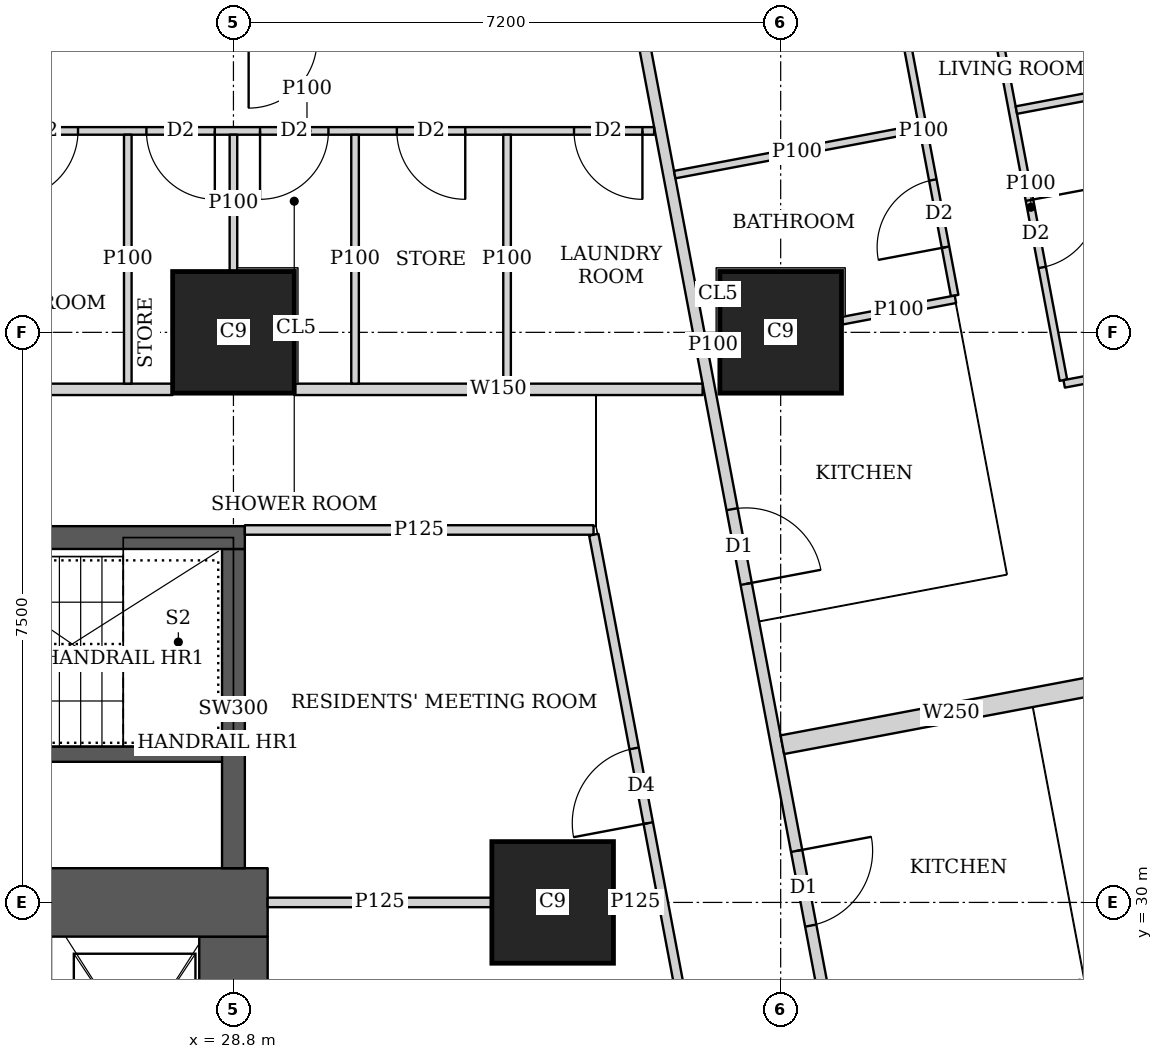
"""IFC4 building model, lengths in metres.
Left out: names, types, materials, properties, quantities, classifications, styles, units other than length and angle.
Written with IfcOpenShell. Run it as: python <this file> out.ifc"""

import sys

from ifc_helpers import new_model, si_unit, direction, frame, frame_2d, origin, origin_2d, place, context, subcontext, project, spatial, rectangle, extrude, element, fill, save


model = new_model("IFC4")
c1 = context("Model", 3, precision=1e-05, world=origin(), true_north=direction((0.0, 1.0)))
c2 = subcontext(c1, "Body", "Model", "MODEL_VIEW")
j1 = project(units=[si_unit("LENGTHUNIT", "METRE"), si_unit("PLANEANGLEUNIT", "RADIAN")], contexts=[c1])
p1 = place(None, origin())
s1 = spatial("IfcSite", under=j1, at=p1, CompositionType="ELEMENT")
p2 = place(p1, origin())
s2 = spatial("IfcBuilding", under=s1, at=p2, CompositionType="ELEMENT")
p3 = place(p2, frame((0.0, 0.0, 100.4)))
s3 = spatial("IfcBuildingStorey", under=s2, at=p3, CompositionType="ELEMENT", Elevation=100.4)
for number, where, z_axis, x_axis in (
    (1, (33.0, 30.0, 0.0), (0.0, 0.0, 1.0), (1.0, 0.0, 0.0)),
    (2, (28.8, 37.5, 0.0), (0.0, 0.0, 1.0), (1.0, 0.0, 0.0)),
    (3, (36.0, 37.5, 0.0), (0.0, 0.0, 1.0), (1.0, 0.0, 0.0)),
):
    element("IfcColumn", number, at=place(p3, frame(where, z_axis=z_axis, x_axis=x_axis)), inside=s3, PredefinedType="COLUMN", context=c2, shape_type="SweptSolid", body=[
        extrude(rectangle(XDim=1.6, YDim=1.6, at=origin_2d()), origin(), (0.0, 0.0, 1.0), 3.75),
    ])
p4 = place(p3, frame((13.95, 30.0, 0.0), z_axis=(0.0, 0.0, 1.0), x_axis=(1.0, 0.0, 0.0)))
e4 = element("IfcWall", 4, at=p4, inside=s3, PredefinedType="SHEAR", context=c2, shape_type="SweptSolid", body=[
    extrude(rectangle(XDim=15.3, YDim=0.9, at=frame_2d((7.65, 0.0))), origin(), (0.0, 0.0, 1.0), 3.75),
])
p5 = place(p4, frame((4.45, 0.0, 0.0)))
e5 = element("IfcOpeningElement", 5, at=p5, cuts=e4, PredefinedType="OPENING", context=c2, shape_type="SweptSolid", body=[
    extrude(rectangle(XDim=1.8, YDim=2.1, at=frame_2d((0.9, 1.05))), frame((0.0, 0.46, 0.0), z_axis=(0.0, -1.0, 0.0), x_axis=(1.0, 0.0, 0.0)), (0.0, 0.0, 1.0), 0.92),
])
p6 = place(p4, frame((10.7, 0.0, 0.0)))
e6 = element("IfcOpeningElement", 6, at=p6, cuts=e4, PredefinedType="OPENING", context=c2, shape_type="SweptSolid", body=[
    extrude(rectangle(XDim=1.1, YDim=2.1, at=frame_2d((0.55, 1.05))), frame((0.0, 0.46, 0.0), z_axis=(0.0, -1.0, 0.0), x_axis=(1.0, 0.0, 0.0)), (0.0, 0.0, 1.0), 0.92),
])
p7 = place(p3, frame((28.8, 15.45, 0.0), z_axis=(0.0, 0.0, 1.0), x_axis=(0.0, 1.0, 0.0)))
e7 = element("IfcWall", 7, at=p7, inside=s3, PredefinedType="SHEAR", context=c2, shape_type="SweptSolid", body=[
    extrude(rectangle(XDim=14.1, YDim=0.9, at=frame_2d((7.05, 0.0))), origin(), (0.0, 0.0, 1.0), 3.75),
])
p8 = place(p3, frame((21.45, 34.8, 0.0), z_axis=(0.0, 0.0, 1.0), x_axis=(1.0, 0.0, 0.0)))
e8 = element("IfcWall", 8, at=p8, inside=s3, PredefinedType="SHEAR", context=c2, shape_type="SweptSolid", body=[
    extrude(rectangle(XDim=7.5, YDim=0.3, at=frame_2d((3.75, 0.0))), origin(), (0.0, 0.0, 1.0), 3.75),
])
p9 = place(p8, frame((0.5, 0.0, 0.0)))
e9 = element("IfcOpeningElement", 9, at=p9, cuts=e8, PredefinedType="OPENING", context=c2, shape_type="SweptSolid", body=[
    extrude(rectangle(XDim=1.1, YDim=2.1, at=frame_2d((0.55, 1.05))), frame((0.0, 0.16, 0.0), z_axis=(0.0, -1.0, 0.0), x_axis=(1.0, 0.0, 0.0)), (0.0, 0.0, 1.0), 0.32),
])
p10 = place(p3, frame((28.8, 30.45, 0.0), z_axis=(0.0, 0.0, 1.0), x_axis=(0.0, 1.0, 0.0)))
e10 = element("IfcWall", 10, at=p10, inside=s3, PredefinedType="SHEAR", context=c2, shape_type="SweptSolid", body=[
    extrude(rectangle(XDim=4.2, YDim=0.3, at=frame_2d((2.1, 0.0))), origin(), (0.0, 0.0, 1.0), 3.75),
])
p11 = place(p3, frame((22.401, 36.75, 0.0), z_axis=(0.0, 0.0, 1.0), x_axis=(1.0, 0.0, 0.0)))
e11 = element("IfcWall", 11, at=p11, inside=s3, PredefinedType="SOLIDWALL", context=c2, shape_type="SweptSolid", body=[
    extrude(rectangle(XDim=5.598, YDim=0.15, at=frame_2d((2.799, 0.0))), origin(), (0.0, 0.0, 1.0), 3.5),
])
p12 = place(p11, frame((0.699, 0.0, 0.0)))
e12 = element("IfcOpeningElement", 12, at=p12, cuts=e11, PredefinedType="OPENING", context=c2, shape_type="SweptSolid", body=[
    extrude(rectangle(XDim=1.0, YDim=2.1, at=frame_2d((0.5, 1.05))), frame((0.0, 0.085, 0.0), z_axis=(0.0, -1.0, 0.0), x_axis=(1.0, 0.0, 0.0)), (0.0, 0.0, 1.0), 0.17),
])
p13 = place(p3, frame((29.601, 36.75, 0.0), z_axis=(0.0, 0.0, 1.0), x_axis=(1.0, 0.0, 0.0)))
e13 = element("IfcWall", 13, at=p13, inside=s3, PredefinedType="SOLIDWALL", context=c2, shape_type="SweptSolid", body=[
    extrude(rectangle(XDim=5.372, YDim=0.15, at=frame_2d((2.686, 0.0))), origin(), (0.0, 0.0, 1.0), 3.5),
])
p14 = place(p3, frame((33.382, 45.65, 0.0), z_axis=(0.0, 0.0, 1.0), x_axis=(0.185593544777, -0.982626600565, 0.0)))
e14 = element("IfcWall", 14, at=p14, inside=s3, PredefinedType="SOLIDWALL", context=c2, shape_type="SweptSolid", body=[
    extrude(rectangle(XDim=47.118, YDim=0.15, at=frame_2d((23.559, 0.0))), origin(), (0.0, 0.0, 1.0), 2.2),
])
p15 = place(p14, frame((10.662, 0.0, 0.0)))
e15 = element("IfcOpeningElement", 15, at=p15, cuts=e14, PredefinedType="OPENING", context=c2, shape_type="SweptSolid", body=[
    extrude(rectangle(XDim=1.0, YDim=2.1, at=frame_2d((0.5, 1.05))), frame((0.0, 0.085, 0.0), z_axis=(0.0, -1.0, 0.0), x_axis=(1.0, 0.0, 0.0)), (0.0, 0.0, 1.0), 0.17),
])
p16 = place(p14, frame((15.237, 0.0, 0.0)))
e16 = element("IfcOpeningElement", 16, at=p16, cuts=e14, PredefinedType="OPENING", context=c2, shape_type="SweptSolid", body=[
    extrude(rectangle(XDim=1.0, YDim=2.1, at=frame_2d((0.5, 1.05))), frame((0.0, 0.085, 0.0), z_axis=(0.0, -1.0, 0.0), x_axis=(1.0, 0.0, 0.0)), (0.0, 0.0, 1.0), 0.17),
])
p17 = place(p14, frame((27.341, 0.0, 0.0)))
e17 = element("IfcOpeningElement", 17, at=p17, cuts=e14, PredefinedType="OPENING", context=c2, shape_type="SweptSolid", body=[
    extrude(rectangle(XDim=1.0, YDim=2.1, at=frame_2d((0.5, 1.05))), frame((0.0, 0.085, 0.0), z_axis=(0.0, -1.0, 0.0), x_axis=(1.0, 0.0, 0.0)), (0.0, 0.0, 1.0), 0.17),
])
p18 = place(p14, frame((33.833, 0.0, 0.0)))
e18 = element("IfcOpeningElement", 18, at=p18, cuts=e14, PredefinedType="OPENING", context=c2, shape_type="SweptSolid", body=[
    extrude(rectangle(XDim=1.0, YDim=2.1, at=frame_2d((0.5, 1.05))), frame((0.0, 0.085, 0.0), z_axis=(0.0, -1.0, 0.0), x_axis=(1.0, 0.0, 0.0)), (0.0, 0.0, 1.0), 0.17),
])
p19 = place(p3, frame((38.862, 41.42, 0.0), z_axis=(0.0, 0.0, 1.0), x_axis=(0.185332907641, -0.982675792592, 0.0)))
e19 = element("IfcWall", 19, at=p19, inside=s3, PredefinedType="PARTITIONING", context=c2, shape_type="SweptSolid", body=[
    extrude(rectangle(XDim=4.629, YDim=0.1, at=frame_2d((2.314, 0.0))), origin(), (0.0, 0.0, 1.0), 3.5),
])
p20 = place(p19, frame((2.22, 0.0, 0.0)))
e20 = element("IfcOpeningElement", 20, at=p20, cuts=e19, PredefinedType="OPENING", context=c2, shape_type="SweptSolid", body=[
    extrude(rectangle(XDim=0.9, YDim=2.1, at=frame_2d((0.45, 1.05))), frame((0.0, 0.06, 0.0), z_axis=(0.0, -1.0, 0.0), x_axis=(1.0, 0.0, 0.0)), (0.0, 0.0, 1.0), 0.12),
])
p21 = place(p3, frame((37.472, 42.309, 0.0), z_axis=(0.0, 0.0, 1.0), x_axis=(0.185641287362, -0.982617581985, 0.0)))
e21 = element("IfcWall", 21, at=p21, inside=s3, PredefinedType="PARTITIONING", context=c2, shape_type="SweptSolid", body=[
    extrude(rectangle(XDim=4.402, YDim=0.1, at=frame_2d((2.201, 0.0))), origin(), (0.0, 0.0, 1.0), 3.5),
])
p22 = place(p21, frame((2.854, 0.0, 0.0)))
e22 = element("IfcOpeningElement", 22, at=p22, cuts=e21, PredefinedType="OPENING", context=c2, shape_type="SweptSolid", body=[
    extrude(rectangle(XDim=0.9, YDim=2.1, at=frame_2d((0.45, 1.05))), frame((0.0, 0.06, 0.0), z_axis=(0.0, -1.0, 0.0), x_axis=(1.0, 0.0, 0.0)), (0.0, 0.0, 1.0), 0.12),
])
p23 = place(p3, frame((43.277, 41.212, 0.0), z_axis=(0.0, 0.0, 1.0), x_axis=(-0.982665405803, -0.185387972203, 0.0)))
e23 = element("IfcWall", 23, at=p23, inside=s3, PredefinedType="PARTITIONING", context=c2, shape_type="SweptSolid", body=[
    extrude(rectangle(XDim=4.25, YDim=0.1, at=frame_2d((2.125, 0.0))), origin(), (0.0, 0.0, 1.0), 2.05),
])
p24 = place(p3, frame((40.954, 37.053, 0.0), z_axis=(0.0, 0.0, 1.0), x_axis=(-0.982663001154, -0.185400717808, 0.0)))
e24 = element("IfcWall", 24, at=p24, inside=s3, PredefinedType="PARTITIONING", context=c2, shape_type="SweptSolid", body=[
    extrude(rectangle(XDim=1.246, YDim=0.1, at=frame_2d((0.623, 0.0))), origin(), (0.0, 0.0, 1.0), 2.05),
])
p25 = place(p3, frame((37.823, 40.182, 0.0), z_axis=(0.0, 0.0, 1.0), x_axis=(-0.982664729897, -0.18539155487, 0.0)))
e25 = element("IfcWall", 25, at=p25, inside=s3, PredefinedType="PARTITIONING", context=c2, shape_type="SweptSolid", body=[
    extrude(rectangle(XDim=3.274, YDim=0.1, at=frame_2d((1.637, 0.0))), origin(), (0.0, 0.0, 1.0), 3.5),
])
p26 = place(p3, frame((38.299, 37.935, 0.0), z_axis=(0.0, 0.0, 1.0), x_axis=(-0.982536828695, -0.186068213993, 0.0)))
e26 = element("IfcWall", 26, at=p26, inside=s3, PredefinedType="PARTITIONING", context=c2, shape_type="SweptSolid", body=[
    extrude(rectangle(XDim=1.515, YDim=0.1, at=frame_2d((0.758, 0.0))), origin(), (0.0, 0.0, 1.0), 3.5),
])
p27 = place(p3, frame((35.19, 37.347, 0.0), z_axis=(0.0, 0.0, 1.0), x_axis=(-0.982404955251, -0.186763229514, 0.0)))
e27 = element("IfcWall", 27, at=p27, inside=s3, PredefinedType="PARTITIONING", context=c2, shape_type="SweptSolid", body=[
    extrude(rectangle(XDim=0.161, YDim=0.1, at=frame_2d((0.081, 0.0))), origin(), (0.0, 0.0, 1.0), 3.5),
])
p28 = place(p3, frame((40.468, 32.915, 0.0), z_axis=(0.0, 0.0, 1.0), x_axis=(-0.982612837616, -0.185666398014, 0.0)))
e28 = element("IfcWall", 28, at=p28, inside=s3, PredefinedType="SOLIDWALL", context=c2, shape_type="SweptSolid", body=[
    extrude(rectangle(XDim=4.525, YDim=0.25, at=frame_2d((2.262, 0.0))), origin(), (0.0, 0.0, 1.0), 3.5),
])
p29 = place(p3, frame((25.2, 40.15, 0.0), z_axis=(0.0, 0.0, 1.0), x_axis=(1.0, 0.0, 0.0)))
e29 = element("IfcWall", 29, at=p29, inside=s3, PredefinedType="PARTITIONING", context=c2, shape_type="SweptSolid", body=[
    extrude(rectangle(XDim=9.135, YDim=0.1, at=frame_2d((4.567, 0.0))), origin(), (0.0, 0.0, 1.0), 3.5),
])
p30 = place(p29, frame((0.655, 0.0, 0.0)))
e30 = element("IfcOpeningElement", 30, at=p30, cuts=e29, PredefinedType="OPENING", context=c2, shape_type="SweptSolid", body=[
    extrude(rectangle(XDim=0.9, YDim=2.1, at=frame_2d((0.45, 1.05))), frame((0.0, 0.06, 0.0), z_axis=(0.0, -1.0, 0.0), x_axis=(1.0, 0.0, 0.0)), (0.0, 0.0, 1.0), 0.12),
])
p31 = place(p29, frame((3.95, 0.0, 0.0)))
e31 = element("IfcOpeningElement", 31, at=p31, cuts=e29, PredefinedType="OPENING", context=c2, shape_type="SweptSolid", body=[
    extrude(rectangle(XDim=0.9, YDim=2.1, at=frame_2d((0.45, 1.05))), frame((0.0, 0.06, 0.0), z_axis=(0.0, -1.0, 0.0), x_axis=(1.0, 0.0, 0.0)), (0.0, 0.0, 1.0), 0.12),
])
p32 = place(p29, frame((8.081, 0.0, 0.0)))
e32 = element("IfcOpeningElement", 32, at=p32, cuts=e29, PredefinedType="OPENING", context=c2, shape_type="SweptSolid", body=[
    extrude(rectangle(XDim=0.9, YDim=2.1, at=frame_2d((0.45, 1.05))), frame((0.0, 0.06, 0.0), z_axis=(0.0, -1.0, 0.0), x_axis=(1.0, 0.0, 0.0)), (0.0, 0.0, 1.0), 0.12),
])
p33 = place(p29, frame((2.455, 0.0, 0.0)))
e33 = element("IfcOpeningElement", 33, at=p33, cuts=e29, PredefinedType="OPENING", context=c2, shape_type="SweptSolid", body=[
    extrude(rectangle(XDim=0.9, YDim=2.1, at=frame_2d((0.45, 1.05))), frame((0.0, 0.06, 0.0), z_axis=(0.0, -1.0, 0.0), x_axis=(1.0, 0.0, 0.0)), (0.0, 0.0, 1.0), 0.12),
])
p34 = place(p29, frame((5.75, 0.0, 0.0)))
e34 = element("IfcOpeningElement", 34, at=p34, cuts=e29, PredefinedType="OPENING", context=c2, shape_type="SweptSolid", body=[
    extrude(rectangle(XDim=0.9, YDim=2.1, at=frame_2d((0.45, 1.05))), frame((0.0, 0.06, 0.0), z_axis=(0.0, -1.0, 0.0), x_axis=(1.0, 0.0, 0.0)), (0.0, 0.0, 1.0), 0.12),
])
p35 = place(p3, frame((28.8, 38.301, 0.0), z_axis=(0.0, 0.0, 1.0), x_axis=(0.0, 1.0, 0.0)))
e35 = element("IfcWall", 35, at=p35, inside=s3, PredefinedType="PARTITIONING", context=c2, shape_type="SweptSolid", body=[
    extrude(rectangle(XDim=1.799, YDim=0.1, at=frame_2d((0.899, 0.0))), origin(), (0.0, 0.0, 1.0), 3.5),
])
for number, where, z_axis, x_axis in (
    (36, (32.4, 36.825, 0.0), (0.0, 0.0, 1.0), (0.0, 1.0, 0.0)),
    (37, (27.41, 36.825, 0.0), (0.0, 0.0, 1.0), (0.0, 1.0, 0.0)),
    (38, (30.4, 36.825, 0.0), (0.0, 0.0, 1.0), (0.0, 1.0, 0.0)),
):
    element("IfcWall", number, at=place(p3, frame(where, z_axis=z_axis, x_axis=x_axis)), inside=s3, PredefinedType="PARTITIONING", context=c2, shape_type="SweptSolid", body=[
        extrude(rectangle(XDim=3.275, YDim=0.1, at=frame_2d((1.638, 0.0))), origin(), (0.0, 0.0, 1.0), 3.5),
    ])
p36 = place(p3, frame((28.95, 34.9, 0.0), z_axis=(0.0, 0.0, 1.0), x_axis=(1.0, 0.0, 0.0)))
e39 = element("IfcWall", 39, at=p36, inside=s3, PredefinedType="PARTITIONING", context=c2, shape_type="SweptSolid", body=[
    extrude(rectangle(XDim=4.588, YDim=0.125, at=frame_2d((2.294, 0.0))), origin(), (0.0, 0.0, 1.0), 3.5),
])
p37 = place(p3, frame((38.202, 10.163, 0.0), z_axis=(0.0, 0.0, 1.0), x_axis=(-0.185610321132, 0.982623431783, 0.0)))
e40 = element("IfcWall", 40, at=p37, inside=s3, PredefinedType="PARTITIONING", context=c2, shape_type="SweptSolid", body=[
    extrude(rectangle(XDim=25.111, YDim=0.125, at=frame_2d((12.556, 0.0))), origin(), (0.0, 0.0, 1.0), 2.5),
])
p38 = place(p37, frame((0.708, 0.0, 0.0)))
e41 = element("IfcOpeningElement", 41, at=p38, cuts=e40, PredefinedType="OPENING", context=c2, shape_type="SweptSolid", body=[
    extrude(rectangle(XDim=1.0, YDim=2.1, at=frame_2d((0.5, 1.05))), frame((0.0, 0.073, 0.0), z_axis=(0.0, -1.0, 0.0), x_axis=(1.0, 0.0, 0.0)), (0.0, 0.0, 1.0), 0.145),
])
p39 = place(p37, frame((6.0, 0.0, 0.0)))
e42 = element("IfcOpeningElement", 42, at=p39, cuts=e40, PredefinedType="OPENING", context=c2, shape_type="SweptSolid", body=[
    extrude(rectangle(XDim=1.0, YDim=2.1, at=frame_2d((0.5, 1.05))), frame((0.0, 0.073, 0.0), z_axis=(0.0, -1.0, 0.0), x_axis=(1.0, 0.0, 0.0)), (0.0, 0.0, 1.0), 0.145),
])
p40 = place(p37, frame((13.378, 0.0, 0.0)))
e43 = element("IfcOpeningElement", 43, at=p40, cuts=e40, PredefinedType="OPENING", context=c2, shape_type="SweptSolid", body=[
    extrude(rectangle(XDim=1.0, YDim=2.1, at=frame_2d((0.5, 1.05))), frame((0.0, 0.073, 0.0), z_axis=(0.0, -1.0, 0.0), x_axis=(1.0, 0.0, 0.0)), (0.0, 0.0, 1.0), 0.145),
])
p41 = place(p37, frame((21.25, 0.0, 0.0)))
e44 = element("IfcOpeningElement", 44, at=p41, cuts=e40, PredefinedType="OPENING", context=c2, shape_type="SweptSolid", body=[
    extrude(rectangle(XDim=1.0, YDim=2.1, at=frame_2d((0.5, 1.05))), frame((0.0, 0.073, 0.0), z_axis=(0.0, -1.0, 0.0), x_axis=(1.0, 0.0, 0.0)), (0.0, 0.0, 1.0), 0.145),
])
p42 = place(p3, frame((29.25, 30.0, 0.0), z_axis=(0.0, 0.0, 1.0), x_axis=(1.0, 0.0, 0.0)))
e45 = element("IfcWall", 45, at=p42, inside=s3, PredefinedType="PARTITIONING", context=c2, shape_type="SweptSolid", body=[
    extrude(rectangle(XDim=2.949, YDim=0.125, at=frame_2d((1.475, 0.0))), origin(), (0.0, 0.0, 1.0), 3.5),
])
p43 = place(p3, frame((33.801, 30.0, 0.0), z_axis=(0.0, 0.0, 1.0), x_axis=(1.0, 0.0, 0.0)))
e46 = element("IfcWall", 46, at=p43, inside=s3, PredefinedType="PARTITIONING", context=c2, shape_type="SweptSolid", body=[
    extrude(rectangle(XDim=0.578, YDim=0.125, at=frame_2d((0.289, 0.0))), origin(), (0.0, 0.0, 1.0), 2.5),
])
p44 = place(p3, frame((23.0, 31.95, 0.0), z_axis=(0.0, 0.0, 1.0), x_axis=(1.0, 0.0, 0.0)))
e47 = element("IfcWall", 47, at=p44, inside=s3, PredefinedType="SHEAR", context=c2, shape_type="SweptSolid", body=[
    extrude(rectangle(XDim=5.8, YDim=0.2, at=frame_2d((2.9, 0.0))), origin(), (0.0, 0.0, 1.0), 3.75),
])
p45 = place(p20, origin())
e48 = element("IfcDoor", 48, at=p45, inside=s3, OperationType="SINGLE_SWING_LEFT", PredefinedType="DOOR", context=c2, shape_type="SweptSolid", body=[
    extrude(rectangle(XDim=0.9, YDim=2.1, at=frame_2d((0.45, 1.05))), frame((0.0, 0.025, 0.0), z_axis=(0.0, -1.0, 0.0), x_axis=(1.0, 0.0, 0.0)), (0.0, 0.0, 1.0), 0.05),
])
fill(e20, e48)
p46 = place(p22, origin())
e49 = element("IfcDoor", 49, at=p46, inside=s3, OperationType="SINGLE_SWING_LEFT", PredefinedType="DOOR", context=c2, shape_type="SweptSolid", body=[
    extrude(rectangle(XDim=0.9, YDim=2.1, at=frame_2d((0.45, 1.05))), frame((0.0, 0.025, 0.0), z_axis=(0.0, -1.0, 0.0), x_axis=(1.0, 0.0, 0.0)), (0.0, 0.0, 1.0), 0.05),
])
fill(e22, e49)
p47 = place(p15, origin())
e50 = element("IfcDoor", 50, at=p47, inside=s3, OperationType="SINGLE_SWING_RIGHT", PredefinedType="DOOR", context=c2, shape_type="SweptSolid", body=[
    extrude(rectangle(XDim=1.0, YDim=2.1, at=frame_2d((0.5, 1.05))), frame((0.0, 0.025, 0.0), z_axis=(0.0, -1.0, 0.0), x_axis=(1.0, 0.0, 0.0)), (0.0, 0.0, 1.0), 0.05),
])
fill(e15, e50)
p48 = place(p16, origin())
e51 = element("IfcDoor", 51, at=p48, inside=s3, OperationType="SINGLE_SWING_LEFT", PredefinedType="DOOR", context=c2, shape_type="SweptSolid", body=[
    extrude(rectangle(XDim=1.0, YDim=2.1, at=frame_2d((0.5, 1.05))), frame((0.0, 0.025, 0.0), z_axis=(0.0, -1.0, 0.0), x_axis=(1.0, 0.0, 0.0)), (0.0, 0.0, 1.0), 0.05),
])
fill(e16, e51)
p49 = place(p30, origin())
e52 = element("IfcDoor", 52, at=p49, inside=s3, OperationType="SINGLE_SWING_RIGHT", PredefinedType="DOOR", context=c2, shape_type="SweptSolid", body=[
    extrude(rectangle(XDim=0.9, YDim=2.1, at=frame_2d((0.45, 1.05))), frame((0.0, 0.025, 0.0), z_axis=(0.0, -1.0, 0.0), x_axis=(1.0, 0.0, 0.0)), (0.0, 0.0, 1.0), 0.05),
])
fill(e30, e52)
p50 = place(p31, origin())
e53 = element("IfcDoor", 53, at=p50, inside=s3, OperationType="SINGLE_SWING_RIGHT", PredefinedType="DOOR", context=c2, shape_type="SweptSolid", body=[
    extrude(rectangle(XDim=0.9, YDim=2.1, at=frame_2d((0.45, 1.05))), frame((0.0, 0.025, 0.0), z_axis=(0.0, -1.0, 0.0), x_axis=(1.0, 0.0, 0.0)), (0.0, 0.0, 1.0), 0.05),
])
fill(e31, e53)
p51 = place(p32, origin())
e54 = element("IfcDoor", 54, at=p51, inside=s3, OperationType="SINGLE_SWING_LEFT", PredefinedType="DOOR", context=c2, shape_type="SweptSolid", body=[
    extrude(rectangle(XDim=0.9, YDim=2.1, at=frame_2d((0.45, 1.05))), frame((0.0, 0.025, 0.0), z_axis=(0.0, -1.0, 0.0), x_axis=(1.0, 0.0, 0.0)), (0.0, 0.0, 1.0), 0.05),
])
fill(e32, e54)
p52 = place(p33, origin())
e55 = element("IfcDoor", 55, at=p52, inside=s3, OperationType="SINGLE_SWING_LEFT", PredefinedType="DOOR", context=c2, shape_type="SweptSolid", body=[
    extrude(rectangle(XDim=0.9, YDim=2.1, at=frame_2d((0.45, 1.05))), frame((0.0, 0.025, 0.0), z_axis=(0.0, -1.0, 0.0), x_axis=(1.0, 0.0, 0.0)), (0.0, 0.0, 1.0), 0.05),
])
fill(e33, e55)
p53 = place(p34, origin())
e56 = element("IfcDoor", 56, at=p53, inside=s3, OperationType="SINGLE_SWING_LEFT", PredefinedType="DOOR", context=c2, shape_type="SweptSolid", body=[
    extrude(rectangle(XDim=0.9, YDim=2.1, at=frame_2d((0.45, 1.05))), frame((0.0, 0.025, 0.0), z_axis=(0.0, -1.0, 0.0), x_axis=(1.0, 0.0, 0.0)), (0.0, 0.0, 1.0), 0.05),
])
fill(e34, e56)
p54 = place(p41, origin())
e57 = element("IfcDoor", 57, at=p54, inside=s3, OperationType="SINGLE_SWING_LEFT", PredefinedType="DOOR", context=c2, shape_type="SweptSolid", body=[
    extrude(rectangle(XDim=1.0, YDim=2.1, at=frame_2d((0.5, 1.05))), frame((0.0, 0.025, 0.0), z_axis=(0.0, -1.0, 0.0), x_axis=(1.0, 0.0, 0.0)), (0.0, 0.0, 1.0), 0.05),
])
fill(e44, e57)
save(model, sys.argv[1])
